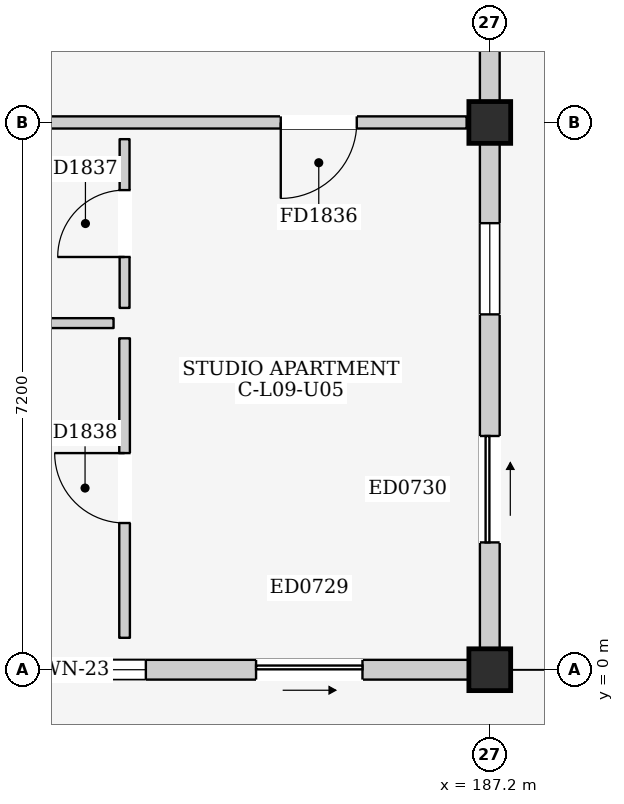
"""IFC4 building model, lengths in metres.
Left out: names, types, materials, properties, quantities, classifications, styles, units other than length and angle.
Written with IfcOpenShell. Run it as: python <this file> out.ifc"""

import sys

from ifc_helpers import new_model, si_unit, direction, frame, frame_2d, origin, origin_2d, place, context, subcontext, project, spatial, rectangle, extrude, element, fill, save


model = new_model("IFC4")
c1 = context("Model", 3, precision=1e-05, world=origin(), true_north=direction((0.0, 1.0)))
c2 = subcontext(c1, "Body", "Model", "MODEL_VIEW")
j1 = project(units=[si_unit("LENGTHUNIT", "METRE"), si_unit("PLANEANGLEUNIT", "RADIAN")], contexts=[c1])
p1 = place(None, origin())
s1 = spatial("IfcSite", under=j1, at=p1, CompositionType="ELEMENT")
p2 = place(p1, origin())
s2 = spatial("IfcBuilding", under=s1, at=p2, CompositionType="ELEMENT")
p3 = place(p2, frame((0.0, 0.0, 31.5)))
s3 = spatial("IfcBuildingStorey", under=s2, at=p3, CompositionType="ELEMENT", Elevation=31.5)
for number, where, z_axis, x_axis in (
    (1, (187.2, 0.0, 0.0), (0.0, 0.0, 1.0), (1.0, 0.0, 0.0)),
    (2, (187.2, 7.2, 0.0), (0.0, 0.0, 1.0), (1.0, 0.0, 0.0)),
):
    element("IfcColumn", number, at=place(p3, frame(where, z_axis=z_axis, x_axis=x_axis)), inside=s3, PredefinedType="COLUMN", context=c2, shape_type="SweptSolid", body=[
        extrude(rectangle(XDim=0.55, YDim=0.55, at=origin_2d()), origin(), (0.0, 0.0, 1.0), 3.3),
    ])
p4 = place(p3, frame((180.275, 0.0, 0.0), z_axis=(0.0, 0.0, 1.0), x_axis=(1.0, 0.0, 0.0)))
e3 = element("IfcWall", 3, at=p4, inside=s3, PredefinedType="ELEMENTEDWALL", context=c2, shape_type="SweptSolid", body=[
    extrude(rectangle(XDim=6.65, YDim=0.26, at=frame_2d((3.325, 0.0))), origin(), (0.0, 0.0, 1.0), 2.615),
])
p5 = place(p4, frame((3.85, 0.0, 0.0)))
e4 = element("IfcOpeningElement", 4, at=p5, cuts=e3, PredefinedType="OPENING", context=c2, shape_type="SweptSolid", body=[
    extrude(rectangle(XDim=1.4, YDim=2.1, at=frame_2d((0.7, 1.05))), frame((0.0, 0.145, 0.0), z_axis=(0.0, -1.0, 0.0), x_axis=(1.0, 0.0, 0.0)), (0.0, 0.0, 1.0), 0.29),
])
p6 = place(p4, frame((0.55, 0.0, 0.9)))
e5 = element("IfcOpeningElement", 5, at=p6, cuts=e3, PredefinedType="OPENING", context=c2, shape_type="SweptSolid", body=[
    extrude(rectangle(XDim=1.85, YDim=1.4, at=frame_2d((0.925, 0.7))), frame((0.0, 0.145, 0.0), z_axis=(0.0, -1.0, 0.0), x_axis=(1.0, 0.0, 0.0)), (0.0, 0.0, 1.0), 0.29),
])
p7 = place(p3, frame((187.2, 0.275, 0.0), z_axis=(0.0, 0.0, 1.0), x_axis=(0.0, 1.0, 0.0)))
e6 = element("IfcWall", 6, at=p7, inside=s3, PredefinedType="ELEMENTEDWALL", context=c2, shape_type="SweptSolid", body=[
    extrude(rectangle(XDim=6.65, YDim=0.26, at=frame_2d((3.325, 0.0))), origin(), (0.0, 0.0, 1.0), 2.615),
])
p8 = place(p7, frame((1.4, 0.0, 0.0)))
e7 = element("IfcOpeningElement", 7, at=p8, cuts=e6, PredefinedType="OPENING", context=c2, shape_type="SweptSolid", body=[
    extrude(rectangle(XDim=1.4, YDim=2.1, at=frame_2d((0.7, 1.05))), frame((0.0, 0.145, 0.0), z_axis=(0.0, -1.0, 0.0), x_axis=(1.0, 0.0, 0.0)), (0.0, 0.0, 1.0), 0.29),
])
p9 = place(p7, frame((4.4, 0.0, 0.95)))
e8 = element("IfcOpeningElement", 8, at=p9, cuts=e6, PredefinedType="OPENING", context=c2, shape_type="SweptSolid", body=[
    extrude(rectangle(XDim=1.2, YDim=1.35, at=frame_2d((0.6, 0.675))), frame((0.0, 0.145, 0.0), z_axis=(0.0, -1.0, 0.0), x_axis=(1.0, 0.0, 0.0)), (0.0, 0.0, 1.0), 0.29),
])
p10 = place(p3, frame((187.2, 7.475, 0.0), z_axis=(0.0, 0.0, 1.0), x_axis=(0.0, 1.0, 0.0)))
e9 = element("IfcWall", 9, at=p10, inside=s3, PredefinedType="ELEMENTEDWALL", context=c2, shape_type="SweptSolid", body=[
    extrude(rectangle(XDim=6.65, YDim=0.26, at=frame_2d((3.325, 0.0))), origin(), (0.0, 0.0, 1.0), 2.615),
])
p11 = place(p10, frame((3.65, 0.0, 0.0)))
e10 = element("IfcOpeningElement", 10, at=p11, cuts=e9, PredefinedType="OPENING", context=c2, shape_type="SweptSolid", body=[
    extrude(rectangle(XDim=1.4, YDim=2.1, at=frame_2d((0.7, 1.05))), frame((0.0, 0.145, 0.0), z_axis=(0.0, -1.0, 0.0), x_axis=(1.0, 0.0, 0.0)), (0.0, 0.0, 1.0), 0.29),
])
p12 = place(p3, frame((180.305, 7.2, 0.0), z_axis=(0.0, 0.0, 1.0), x_axis=(1.0, 0.0, 0.0)))
e11 = element("IfcWall", 11, at=p12, inside=s3, PredefinedType="PARTITIONING", context=c2, shape_type="SweptSolid", body=[
    extrude(rectangle(XDim=6.59, YDim=0.16, at=frame_2d((3.295, 0.0))), origin(), (0.0, 0.0, 1.0), 2.465),
])
p13 = place(p12, frame((4.145, 0.0, 0.0)))
e12 = element("IfcOpeningElement", 12, at=p13, cuts=e11, PredefinedType="OPENING", context=c2, shape_type="SweptSolid", body=[
    extrude(rectangle(XDim=1.0, YDim=2.15, at=frame_2d((0.5, 1.075))), frame((0.0, 0.095, 0.0), z_axis=(0.0, -1.0, 0.0), x_axis=(1.0, 0.0, 0.0)), (0.0, 0.0, 1.0), 0.19),
])
p14 = place(p3, frame((180.2, 4.56, 0.0), z_axis=(0.0, 0.0, 1.0), x_axis=(1.0, 0.0, 0.0)))
e13 = element("IfcWall", 13, at=p14, inside=s3, PredefinedType="PARTITIONING", context=c2, shape_type="SweptSolid", body=[
    extrude(rectangle(XDim=2.05, YDim=0.13, at=frame_2d((1.025, 0.0))), origin(), (0.0, 0.0, 1.0), 3.08),
])
p15 = place(p3, frame((182.395, 4.76, 0.0), z_axis=(0.0, 0.0, 1.0), x_axis=(0.0, 1.0, 0.0)))
e14 = element("IfcWall", 14, at=p15, inside=s3, PredefinedType="PARTITIONING", context=c2, shape_type="SweptSolid", body=[
    extrude(rectangle(XDim=2.22, YDim=0.13, at=frame_2d((1.11, 0.0))), origin(), (0.0, 0.0, 1.0), 3.08),
])
p16 = place(p15, frame((0.67, 0.0, 0.0)))
e15 = element("IfcOpeningElement", 15, at=p16, cuts=e14, PredefinedType="OPENING", context=c2, shape_type="SweptSolid", body=[
    extrude(rectangle(XDim=0.88, YDim=2.1, at=frame_2d((0.44, 1.05))), frame((0.0, 0.08, 0.0), z_axis=(0.0, -1.0, 0.0), x_axis=(1.0, 0.0, 0.0)), (0.0, 0.0, 1.0), 0.16),
])
p17 = place(p3, frame((182.395, 0.42, 0.0), z_axis=(0.0, 0.0, 1.0), x_axis=(0.0, 1.0, 0.0)))
e16 = element("IfcWall", 16, at=p17, inside=s3, PredefinedType="PARTITIONING", context=c2, shape_type="SweptSolid", body=[
    extrude(rectangle(XDim=3.94, YDim=0.14, at=frame_2d((1.97, 0.0))), origin(), (0.0, 0.0, 1.0), 3.08),
])
p18 = place(p17, frame((1.51, 0.0, 0.0)))
e17 = element("IfcOpeningElement", 17, at=p18, cuts=e16, PredefinedType="OPENING", context=c2, shape_type="SweptSolid", body=[
    extrude(rectangle(XDim=0.92, YDim=2.1, at=frame_2d((0.46, 1.05))), frame((0.0, 0.085, 0.0), z_axis=(0.0, -1.0, 0.0), x_axis=(1.0, 0.0, 0.0)), (0.0, 0.0, 1.0), 0.17),
])
p19 = place(p5, frame((1.4, 0.0, 0.0), z_axis=(0.0, 0.0, 1.0), x_axis=(-1.0, 0.0, 0.0)))
e18 = element("IfcDoor", 18, at=p19, inside=s3, OperationType="SLIDING_TO_RIGHT", PredefinedType="DOOR", context=c2, shape_type="SweptSolid", body=[
    extrude(rectangle(XDim=1.4, YDim=2.1, at=frame_2d((0.7, 1.05))), frame((0.0, 0.025, 0.0), z_axis=(0.0, -1.0, 0.0), x_axis=(1.0, 0.0, 0.0)), (0.0, 0.0, 1.0), 0.05),
])
fill(e4, e18)
p20 = place(p6, origin())
e19 = element("IfcWindow", 19, at=p20, inside=s3, PartitioningType="DOUBLE_PANEL_VERTICAL", PredefinedType="WINDOW", context=c2, shape_type="SweptSolid", body=[
    extrude(rectangle(XDim=1.85, YDim=1.4, at=frame_2d((0.925, 0.7))), frame((0.0, 0.03, 0.0), z_axis=(0.0, -1.0, 0.0), x_axis=(1.0, 0.0, 0.0)), (0.0, 0.0, 1.0), 0.06),
])
fill(e5, e19)
p21 = place(p8, frame((1.4, 0.0, 0.0), z_axis=(0.0, 0.0, 1.0), x_axis=(-1.0, 0.0, 0.0)))
e20 = element("IfcDoor", 20, at=p21, inside=s3, OperationType="SLIDING_TO_RIGHT", PredefinedType="DOOR", context=c2, shape_type="SweptSolid", body=[
    extrude(rectangle(XDim=1.4, YDim=2.1, at=frame_2d((0.7, 1.05))), frame((0.0, 0.025, 0.0), z_axis=(0.0, -1.0, 0.0), x_axis=(1.0, 0.0, 0.0)), (0.0, 0.0, 1.0), 0.05),
])
fill(e7, e20)
p22 = place(p9, origin())
e21 = element("IfcWindow", 21, at=p22, inside=s3, PartitioningType="SINGLE_PANEL", PredefinedType="WINDOW", context=c2, shape_type="SweptSolid", body=[
    extrude(rectangle(XDim=1.2, YDim=1.35, at=frame_2d((0.6, 0.675))), frame((0.0, 0.03, 0.0), z_axis=(0.0, -1.0, 0.0), x_axis=(1.0, 0.0, 0.0)), (0.0, 0.0, 1.0), 0.06),
])
fill(e8, e21)
p23 = place(p13, frame((1.0, 0.0, 0.0), z_axis=(0.0, 0.0, 1.0), x_axis=(-1.0, 0.0, 0.0)))
e22 = element("IfcDoor", 22, at=p23, inside=s3, OperationType="SINGLE_SWING_RIGHT", PredefinedType="DOOR", context=c2, shape_type="SweptSolid", body=[
    extrude(rectangle(XDim=1.0, YDim=2.15, at=frame_2d((0.5, 1.075))), frame((0.0, 0.025, 0.0), z_axis=(0.0, -1.0, 0.0), x_axis=(1.0, 0.0, 0.0)), (0.0, 0.0, 1.0), 0.05),
])
fill(e12, e22)
p24 = place(p16, origin())
e23 = element("IfcDoor", 23, at=p24, inside=s3, OperationType="SINGLE_SWING_LEFT", PredefinedType="DOOR", context=c2, shape_type="SweptSolid", body=[
    extrude(rectangle(XDim=0.88, YDim=2.1, at=frame_2d((0.44, 1.05))), frame((0.0, 0.025, 0.0), z_axis=(0.0, -1.0, 0.0), x_axis=(1.0, 0.0, 0.0)), (0.0, 0.0, 1.0), 0.05),
])
fill(e15, e23)
p25 = place(p18, origin())
e24 = element("IfcDoor", 24, at=p25, inside=s3, OperationType="SINGLE_SWING_RIGHT", PredefinedType="DOOR", context=c2, shape_type="SweptSolid", body=[
    extrude(rectangle(XDim=0.92, YDim=2.1, at=frame_2d((0.46, 1.05))), frame((0.0, 0.025, 0.0), z_axis=(0.0, -1.0, 0.0), x_axis=(1.0, 0.0, 0.0)), (0.0, 0.0, 1.0), 0.05),
])
fill(e17, e24)
save(model, sys.argv[1])
